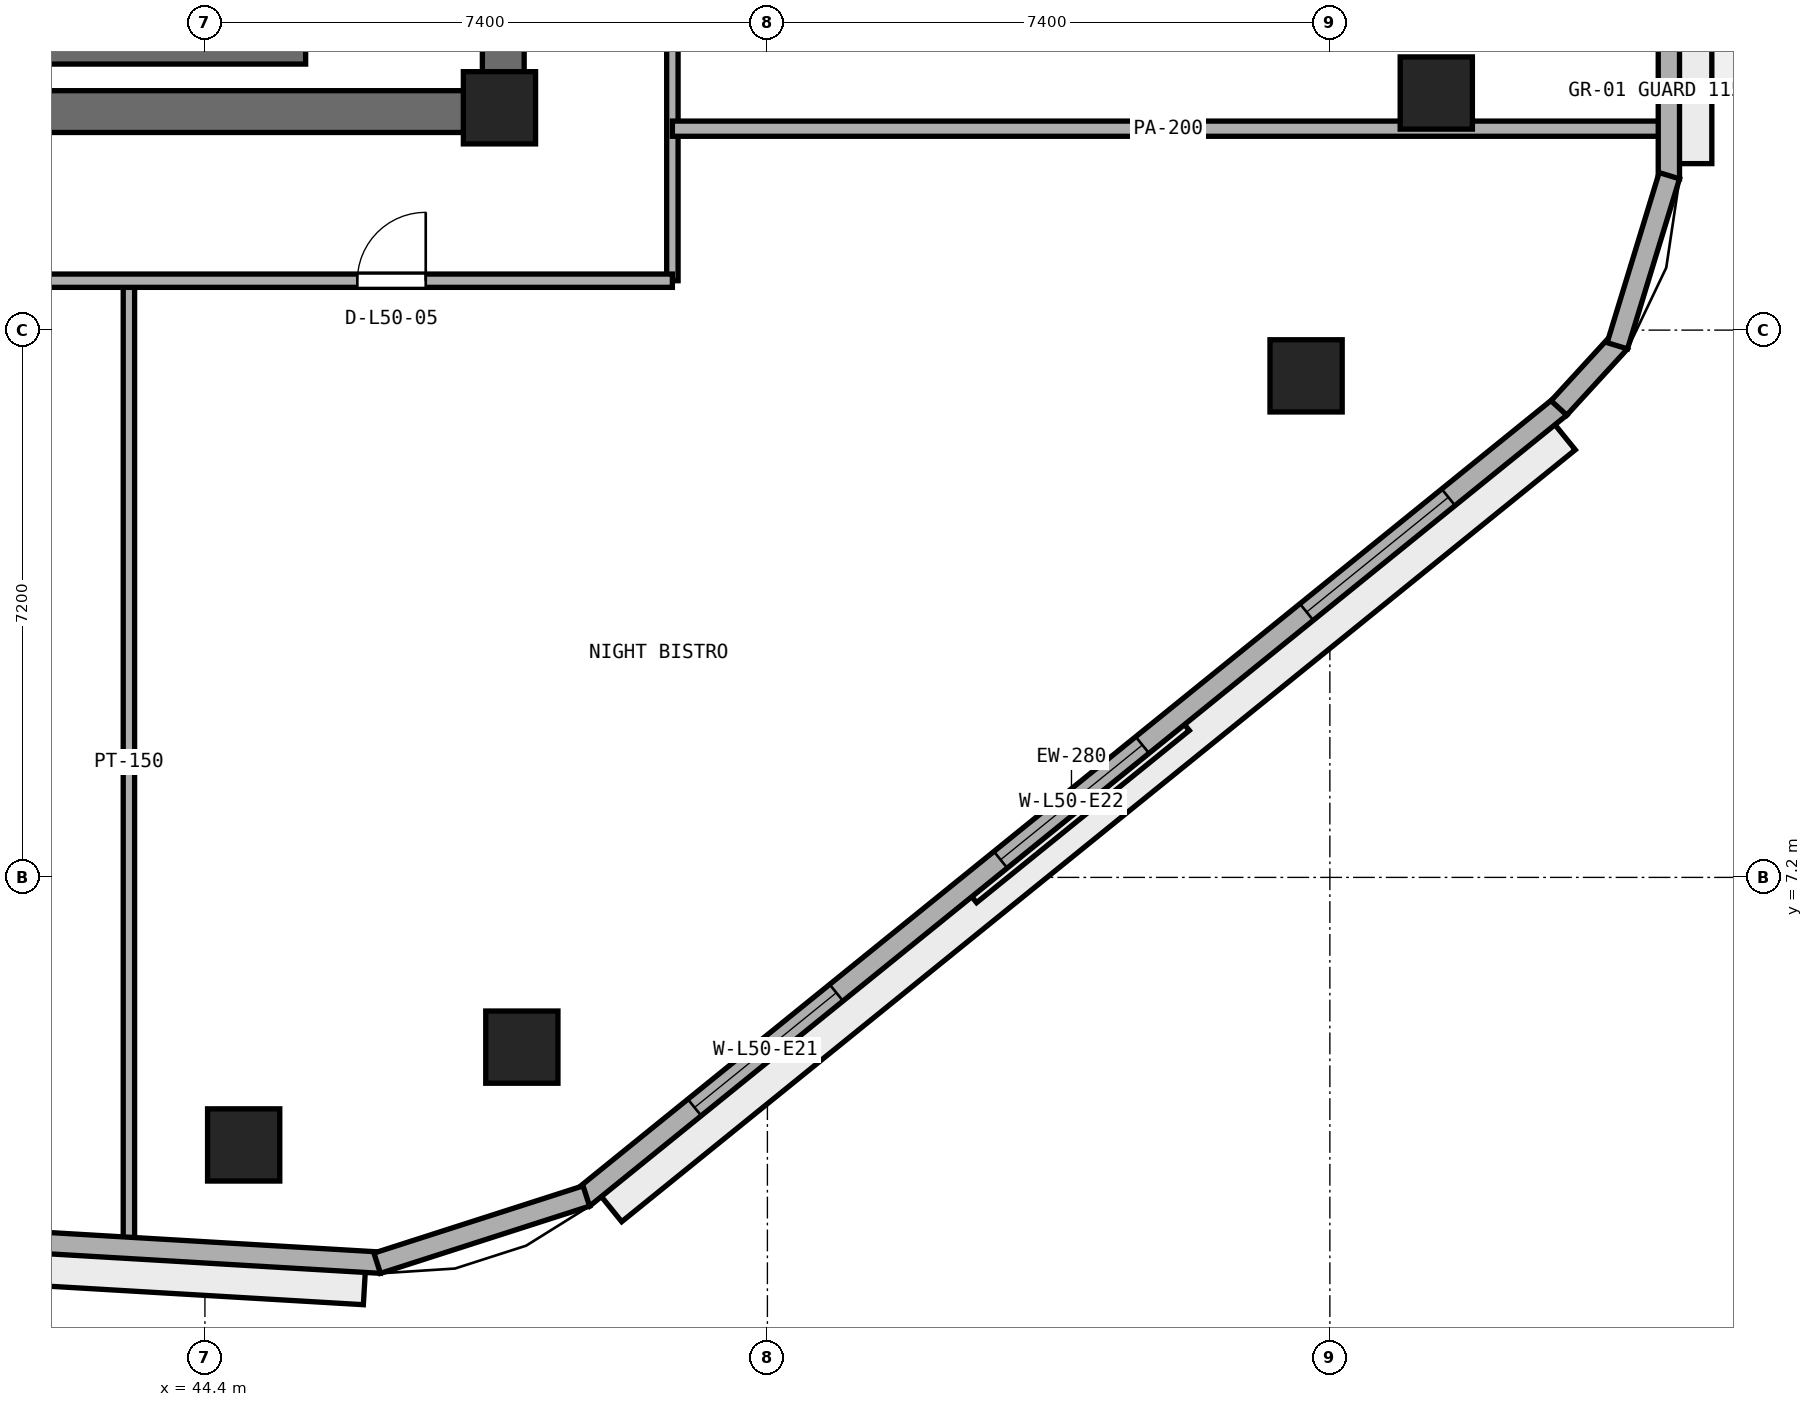
"""IFC4 building model, lengths in metres.
Left out: names, types, materials, properties, quantities, classifications, styles, units other than length and angle.
Written with IfcOpenShell. Run it as: python <this file> out.ifc"""

import sys

from ifc_helpers import new_model, si_unit, direction, frame, frame_2d, origin, origin_2d, place, context, subcontext, project, spatial, rectangle, extrude, element, fill, save


model = new_model("IFC4")
c1 = context("Model", 3, precision=1e-05, world=origin(), true_north=direction((0.0, 1.0)))
c2 = subcontext(c1, "Body", "Model", "MODEL_VIEW")
j1 = project(units=[si_unit("LENGTHUNIT", "METRE"), si_unit("PLANEANGLEUNIT", "RADIAN")], contexts=[c1])
p1 = place(None, origin())
s1 = spatial("IfcSite", under=j1, at=p1, CompositionType="ELEMENT")
p2 = place(p1, origin())
s2 = spatial("IfcBuilding", under=s1, at=p2, CompositionType="ELEMENT")
p3 = place(p2, frame((0.0, 0.0, 197.2)))
s3 = spatial("IfcBuildingStorey", under=s2, at=p3, CompositionType="ELEMENT", Elevation=197.2)
p4 = place(p3, frame((25.4, 17.275, 0.0), z_axis=(0.0, 0.0, 1.0), x_axis=(1.0, 0.0, 0.0)))
e1 = element("IfcWall", 1, at=p4, inside=s3, PredefinedType="SHEAR", context=c2, shape_type="SweptSolid", body=[
    extrude(rectangle(XDim=23.2, YDim=0.55, at=frame_2d((11.6, 0.0))), origin(), (0.0, 0.0, 1.0), 3.54),
])
p5 = place(p3, frame((48.325, 17.55, 0.0), z_axis=(0.0, 0.0, 1.0), x_axis=(0.0, 1.0, 0.0)))
e2 = element("IfcWall", 2, at=p5, inside=s3, PredefinedType="SHEAR", context=c2, shape_type="SweptSolid", body=[
    extrude(rectangle(XDim=15.3, YDim=0.55, at=frame_2d((7.65, 0.0))), origin(), (0.0, 0.0, 1.0), 3.54),
])
p6 = place(p5, frame((5.75, 0.0, 0.0)))
e3 = element("IfcOpeningElement", 3, at=p6, cuts=e2, PredefinedType="OPENING", context=c2, shape_type="SweptSolid", body=[
    extrude(rectangle(XDim=1.5, YDim=2.15, at=frame_2d((0.75, 1.075))), frame((0.0, 0.285, 0.0), z_axis=(0.0, -1.0, 0.0), x_axis=(1.0, 0.0, 0.0)), (0.0, 0.0, 1.0), 0.57),
])
p7 = place(p3, frame((48.275, 17.325, 0.0), z_axis=(0.0, 0.0, 1.0), x_axis=(1.0, 0.0, 0.0)))
e4 = element("IfcColumn", 4, at=p7, inside=s3, PredefinedType="PILASTER", context=c2, shape_type="SweptSolid", body=[
    extrude(rectangle(XDim=0.95, YDim=0.95, at=origin_2d()), origin(), (0.0, 0.0, 1.0), 3.8),
])
for number, where, z_axis, x_axis in (
    (5, (44.91, 3.68, 0.0), (0.0, 0.0, 1.0), (1.0, 0.0, 0.0)),
    (6, (48.57, 4.967, 0.0), (0.0, 0.0, 1.0), (1.0, 0.0, 0.0)),
    (7, (58.887, 13.798, 0.0), (0.0, 0.0, 1.0), (1.0, 0.0, 0.0)),
    (8, (60.6, 17.519, 0.0), (0.0, 0.0, 1.0), (1.0, 0.0, 0.0)),
):
    element("IfcColumn", number, at=place(p3, frame(where, z_axis=z_axis, x_axis=x_axis)), inside=s3, PredefinedType="COLUMN", context=c2, shape_type="SweptSolid", body=[
        extrude(rectangle(XDim=0.95, YDim=0.95, at=origin_2d()), origin(), (0.0, 0.0, 1.0), 3.8),
    ])
p8 = place(p3, frame((38.425, 18.025, 0.0), z_axis=(0.0, 0.0, 1.0), x_axis=(1.0, 0.0, 0.0)))
e9 = element("IfcWall", 9, at=p8, inside=s3, PredefinedType="SHEAR", context=c2, shape_type="SweptSolid", body=[
    extrude(rectangle(XDim=7.3, YDim=0.25, at=frame_2d((3.65, 0.0))), origin(), (0.0, 0.0, 1.0), 3.54),
])
p9 = place(p3, frame((50.55, 15.05, 0.0), z_axis=(0.0, 0.0, 1.0), x_axis=(0.0, 1.0, 0.0)))
e10 = element("IfcWall", 10, at=p9, inside=s3, PredefinedType="PARTITIONING", context=c2, shape_type="SweptSolid", body=[
    extrude(rectangle(XDim=8.8, YDim=0.15, at=frame_2d((4.4, 0.0))), origin(), (0.0, 0.0, 1.0), 3.54),
])
p10 = place(p3, frame((43.4, 2.391, 0.0), z_axis=(0.0, 0.0, 1.0), x_axis=(0.0, 1.0, 0.0)))
e11 = element("IfcWall", 11, at=p10, inside=s3, PredefinedType="PARTITIONING", context=c2, shape_type="SweptSolid", body=[
    extrude(rectangle(XDim=12.659, YDim=0.15, at=frame_2d((6.33, 0.0))), origin(), (0.0, 0.0, 1.0), 3.54),
])
p11 = place(p3, frame((23.45, 15.05, 0.0), z_axis=(0.0, 0.0, 1.0), x_axis=(1.0, 0.0, 0.0)))
e12 = element("IfcWall", 12, at=p11, inside=s3, PredefinedType="PARTITIONING", context=c2, shape_type="SweptSolid", body=[
    extrude(rectangle(XDim=27.1, YDim=0.175, at=frame_2d((13.55, 0.0))), origin(), (0.0, 0.0, 1.0), 3.54),
])
p12 = place(p11, frame((3.895, 0.0, 0.0)))
e13 = element("IfcOpeningElement", 13, at=p12, cuts=e12, PredefinedType="OPENING", context=c2, shape_type="SweptSolid", body=[
    extrude(rectangle(XDim=0.9, YDim=2.1, at=frame_2d((0.45, 1.05))), frame((0.0, 0.097, 0.0), z_axis=(0.0, -1.0, 0.0), x_axis=(1.0, 0.0, 0.0)), (0.0, 0.0, 1.0), 0.195),
])
p13 = place(p11, frame((13.75, 0.0, 0.0)))
e14 = element("IfcOpeningElement", 14, at=p13, cuts=e12, PredefinedType="OPENING", context=c2, shape_type="SweptSolid", body=[
    extrude(rectangle(XDim=0.9, YDim=2.1, at=frame_2d((0.45, 1.05))), frame((0.0, 0.097, 0.0), z_axis=(0.0, -1.0, 0.0), x_axis=(1.0, 0.0, 0.0)), (0.0, 0.0, 1.0), 0.195),
])
p14 = place(p11, frame((22.955, 0.0, 0.0)))
e15 = element("IfcOpeningElement", 15, at=p14, cuts=e12, PredefinedType="OPENING", context=c2, shape_type="SweptSolid", body=[
    extrude(rectangle(XDim=0.9, YDim=2.1, at=frame_2d((0.45, 1.05))), frame((0.0, 0.097, 0.0), z_axis=(0.0, -1.0, 0.0), x_axis=(1.0, 0.0, 0.0)), (0.0, 0.0, 1.0), 0.195),
])
p15 = place(p3, frame((50.55, 17.05, 0.0), z_axis=(0.0, 0.0, 1.0), x_axis=(1.0, 0.0, 0.0)))
e16 = element("IfcWall", 16, at=p15, inside=s3, PredefinedType="PARTITIONING", context=c2, shape_type="SweptSolid", body=[
    extrude(rectangle(XDim=13.045, YDim=0.2, at=frame_2d((6.522, 0.0))), origin(), (0.0, 0.0, 1.0), 2.79),
])
p16 = place(p3, frame((28.966, 3.175, 0.0), z_axis=(0.0, 0.0, 1.0), x_axis=(0.998274467859, -0.058720412304, 0.0)))
e17 = element("IfcWall", 17, at=p16, inside=s3, PredefinedType="STANDARD", context=c2, shape_type="SweptSolid", body=[
    extrude(rectangle(XDim=17.782, YDim=0.28, at=frame_2d((8.891, 0.0))), origin(), (0.0, 0.0, 1.0), 3.54),
])
p17 = place(p16, frame((7.691, 0.0, 0.9)))
e18 = element("IfcOpeningElement", 18, at=p17, cuts=e17, PredefinedType="OPENING", context=c2, shape_type="SweptSolid", body=[
    extrude(rectangle(XDim=2.4, YDim=1.75, at=frame_2d((1.2, 0.875))), frame((0.0, 0.15, 0.0), z_axis=(0.0, -1.0, 0.0), x_axis=(1.0, 0.0, 0.0)), (0.0, 0.0, 1.0), 0.3),
])
p18 = place(p3, frame((49.372, 2.984, 0.0), z_axis=(0.0, 0.0, 1.0), x_axis=(0.777278899851, 0.629156190343, 0.0)))
e19 = element("IfcWall", 19, at=p18, inside=s3, PredefinedType="STANDARD", context=c2, shape_type="SweptSolid", body=[
    extrude(rectangle(XDim=16.54, YDim=0.28, at=frame_2d((8.27, 0.0))), origin(), (0.0, 0.0, 1.0), 3.54),
])
p19 = place(p18, frame((1.89, 0.0, 0.9)))
e20 = element("IfcOpeningElement", 20, at=p19, cuts=e19, PredefinedType="OPENING", context=c2, shape_type="SweptSolid", body=[
    extrude(rectangle(XDim=2.4, YDim=1.75, at=frame_2d((1.2, 0.875))), frame((0.0, 0.15, 0.0), z_axis=(0.0, -1.0, 0.0), x_axis=(1.0, 0.0, 0.0)), (0.0, 0.0, 1.0), 0.3),
])
p20 = place(p18, frame((7.07, 0.0, 0.9)))
e21 = element("IfcOpeningElement", 21, at=p20, cuts=e19, PredefinedType="OPENING", context=c2, shape_type="SweptSolid", body=[
    extrude(rectangle(XDim=2.4, YDim=1.75, at=frame_2d((1.2, 0.875))), frame((0.0, 0.15, 0.0), z_axis=(0.0, -1.0, 0.0), x_axis=(1.0, 0.0, 0.0)), (0.0, 0.0, 1.0), 0.3),
])
p21 = place(p18, frame((12.25, 0.0, 0.9)))
e22 = element("IfcOpeningElement", 22, at=p21, cuts=e19, PredefinedType="OPENING", context=c2, shape_type="SweptSolid", body=[
    extrude(rectangle(XDim=2.4, YDim=1.75, at=frame_2d((1.2, 0.875))), frame((0.0, 0.15, 0.0), z_axis=(0.0, -1.0, 0.0), x_axis=(1.0, 0.0, 0.0)), (0.0, 0.0, 1.0), 0.3),
])
p22 = place(p3, frame((63.66, 16.39, 0.0), z_axis=(0.0, 0.0, 1.0), x_axis=(0.0, 1.0, 0.0)))
e23 = element("IfcWall", 23, at=p22, inside=s3, PredefinedType="STANDARD", context=c2, shape_type="SweptSolid", body=[
    extrude(rectangle(XDim=18.876, YDim=0.28, at=frame_2d((9.438, 0.0))), origin(), (0.0, 0.0, 1.0), 3.54),
])
p23 = place(p22, frame((8.588, 0.0, 0.0)))
e24 = element("IfcOpeningElement", 24, at=p23, cuts=e23, PredefinedType="OPENING", context=c2, shape_type="SweptSolid", body=[
    extrude(rectangle(XDim=1.1, YDim=2.2, at=frame_2d((0.55, 1.1))), frame((0.0, 0.15, 0.0), z_axis=(0.0, -1.0, 0.0), x_axis=(1.0, 0.0, 0.0)), (0.0, 0.0, 1.0), 0.3),
])
p24 = place(p22, frame((2.279, 0.0, 0.9)))
e25 = element("IfcOpeningElement", 25, at=p24, cuts=e23, PredefinedType="OPENING", context=c2, shape_type="SweptSolid", body=[
    extrude(rectangle(XDim=2.4, YDim=1.75, at=frame_2d((1.2, 0.875))), frame((0.0, 0.15, 0.0), z_axis=(0.0, -1.0, 0.0), x_axis=(1.0, 0.0, 0.0)), (0.0, 0.0, 1.0), 0.3),
])
p25 = place(p22, frame((14.197, 0.0, 0.9)))
e26 = element("IfcOpeningElement", 26, at=p25, cuts=e23, PredefinedType="OPENING", context=c2, shape_type="SweptSolid", body=[
    extrude(rectangle(XDim=2.4, YDim=1.75, at=frame_2d((1.2, 0.875))), frame((0.0, 0.15, 0.0), z_axis=(0.0, -1.0, 0.0), x_axis=(1.0, 0.0, 0.0)), (0.0, 0.0, 1.0), 0.3),
])
p26 = place(p3, frame((46.666, 2.124, 0.0), z_axis=(0.0, 0.0, 1.0), x_axis=(0.952065470694, 0.305894327363, 0.0)))
e27 = element("IfcWall", 27, at=p26, inside=s3, PredefinedType="STANDARD", context=c2, shape_type="SweptSolid", body=[
    extrude(rectangle(XDim=2.89, YDim=0.28, at=frame_2d((1.445, 0.0))), origin(), (0.0, 0.0, 1.0), 3.54),
])
p27 = place(p3, frame((62.213, 13.376, 0.0), z_axis=(0.0, 0.0, 1.0), x_axis=(0.675790054291, 0.737094161232, 0.0)))
e28 = element("IfcWall", 28, at=p27, inside=s3, PredefinedType="STANDARD", context=c2, shape_type="SweptSolid", body=[
    extrude(rectangle(XDim=1.183, YDim=0.28, at=frame_2d((0.591, 0.0))), origin(), (0.0, 0.0, 1.0), 3.54),
])
p28 = place(p3, frame((62.982, 14.194, 0.0), z_axis=(0.0, 0.0, 1.0), x_axis=(0.292398811023, 0.956296468315, 0.0)))
e29 = element("IfcWall", 29, at=p28, inside=s3, PredefinedType="STANDARD", context=c2, shape_type="SweptSolid", body=[
    extrude(rectangle(XDim=2.34, YDim=0.28, at=frame_2d((1.17, 0.0))), origin(), (0.0, 0.0, 1.0), 3.54),
])
p29 = place(p14, origin())
e30 = element("IfcDoor", 30, at=p29, inside=s3, OperationType="SINGLE_SWING_RIGHT", PredefinedType="DOOR", context=c2, shape_type="SweptSolid", body=[
    extrude(rectangle(XDim=0.9, YDim=2.1, at=frame_2d((0.45, 1.05))), frame((0.0, 0.025, 0.0), z_axis=(0.0, -1.0, 0.0), x_axis=(1.0, 0.0, 0.0)), (0.0, 0.0, 1.0), 0.05),
])
fill(e15, e30)
p30 = place(p19, origin())
e31 = element("IfcWindow", 31, at=p30, inside=s3, PartitioningType="SINGLE_PANEL", PredefinedType="WINDOW", context=c2, shape_type="SweptSolid", body=[
    extrude(rectangle(XDim=2.4, YDim=1.75, at=frame_2d((1.2, 0.875))), frame((0.0, 0.03, 0.0), z_axis=(0.0, -1.0, 0.0), x_axis=(1.0, 0.0, 0.0)), (0.0, 0.0, 1.0), 0.06),
])
fill(e20, e31)
p31 = place(p20, origin())
e32 = element("IfcWindow", 32, at=p31, inside=s3, PartitioningType="SINGLE_PANEL", PredefinedType="WINDOW", context=c2, shape_type="SweptSolid", body=[
    extrude(rectangle(XDim=2.4, YDim=1.75, at=frame_2d((1.2, 0.875))), frame((0.0, 0.03, 0.0), z_axis=(0.0, -1.0, 0.0), x_axis=(1.0, 0.0, 0.0)), (0.0, 0.0, 1.0), 0.06),
])
fill(e21, e32)
p32 = place(p21, origin())
e33 = element("IfcWindow", 33, at=p32, inside=s3, PartitioningType="SINGLE_PANEL", PredefinedType="WINDOW", context=c2, shape_type="SweptSolid", body=[
    extrude(rectangle(XDim=2.4, YDim=1.75, at=frame_2d((1.2, 0.875))), frame((0.0, 0.03, 0.0), z_axis=(0.0, -1.0, 0.0), x_axis=(1.0, 0.0, 0.0)), (0.0, 0.0, 1.0), 0.06),
])
fill(e22, e33)
save(model, sys.argv[1])
